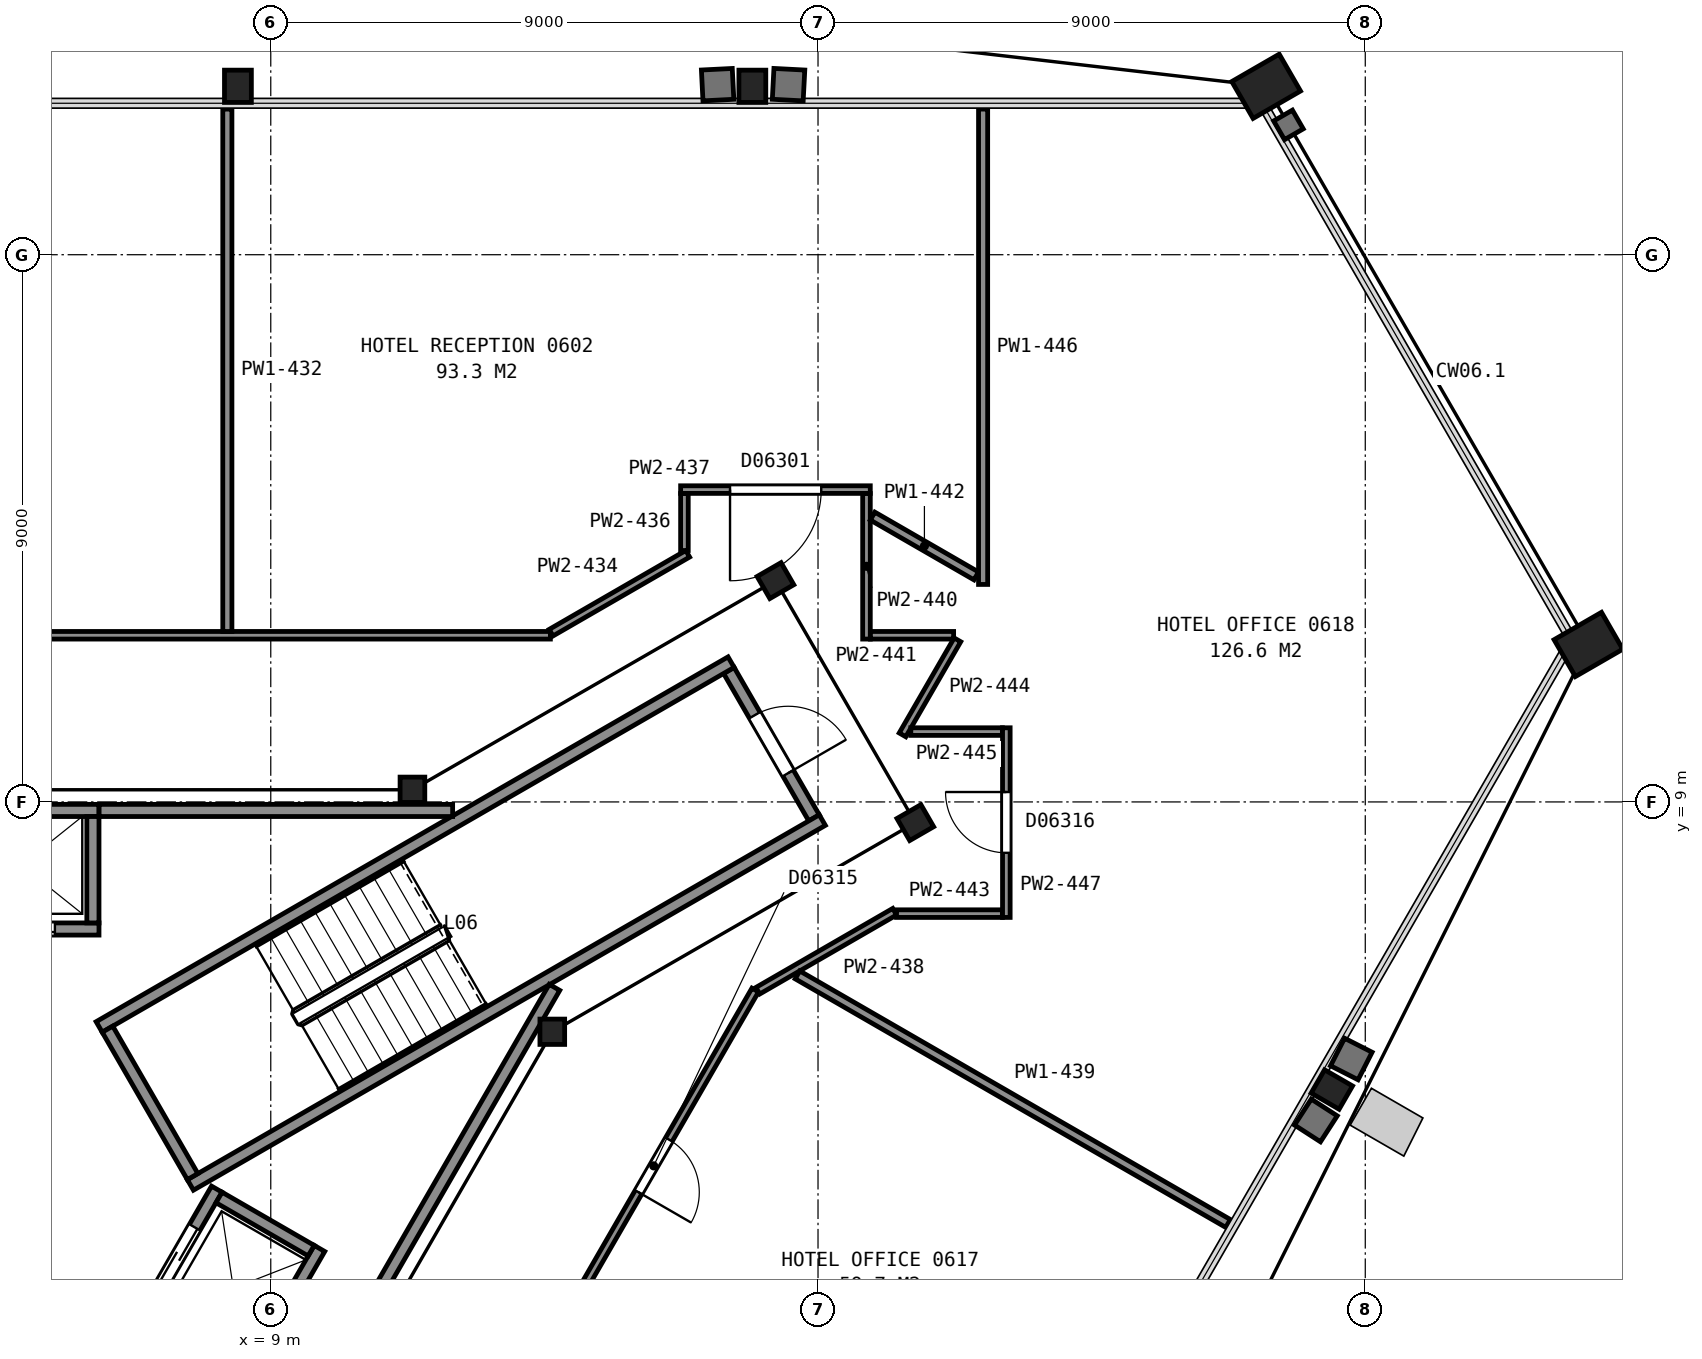
"""IFC4 building model, lengths in metres.
Left out: names, types, materials, properties, quantities, classifications, styles, units other than length and angle.
Written with IfcOpenShell. Run it as: python <this file> out.ifc"""

import sys

from ifc_helpers import new_model, si_unit, direction, frame, frame_2d, origin, origin_2d, place, context, subcontext, project, spatial, rectangle, hollow_rectangle, i_section, extrude, element, fill, save


model = new_model("IFC4")
c1 = context("Model", 3, precision=1e-05, world=origin(), true_north=direction((0.0, 1.0)))
c2 = subcontext(c1, "Body", "Model", "MODEL_VIEW")
j1 = project(units=[si_unit("LENGTHUNIT", "METRE"), si_unit("PLANEANGLEUNIT", "RADIAN")], contexts=[c1])
p1 = place(None, origin())
s1 = spatial("IfcSite", under=j1, at=p1, CompositionType="ELEMENT")
p2 = place(p1, origin())
s2 = spatial("IfcBuilding", under=s1, at=p2, CompositionType="ELEMENT")
p3 = place(p2, frame((0.0, 0.0, 36.8)))
s3 = spatial("IfcBuildingStorey", under=s2, at=p3, CompositionType="ELEMENT", Elevation=36.8)
p4 = place(p3, frame((25.37, 20.77, 0.045), z_axis=(0.0, 0.0, 1.0), x_axis=(0.5, -0.866025403784, 0.0)))
e1 = element("IfcColumn", 1, at=p4, inside=s3, PredefinedType="COLUMN", context=c2, shape_type="SweptSolid", body=[
    extrude(hollow_rectangle(XDim=0.7, YDim=0.9, WallThickness=0.065, at=origin_2d()), origin(), (0.0, 0.0, 1.0), 3.555),
])
p5 = place(p3, frame((16.92, 20.77, 0.03), z_axis=(0.0, 0.0, 1.0), x_axis=(1.0, 0.0, 0.0)))
e2 = element("IfcColumn", 2, at=p5, inside=s3, PredefinedType="COLUMN", context=c2, shape_type="SweptSolid", body=[
    extrude(i_section(OverallWidth=0.442, OverallDepth=0.531, WebThickness=0.066, FlangeThickness=0.106, FilletRadius=0.015, at=origin_2d()), origin(), (0.0, 0.0, 1.0), 3.57),
])
p6 = place(p3, frame((8.46, 20.77, 0.025), z_axis=(0.0, 0.0, 1.0), x_axis=(1.0, 0.0, 0.0)))
e3 = element("IfcColumn", 3, at=p6, inside=s3, PredefinedType="COLUMN", context=c2, shape_type="SweptSolid", body=[
    extrude(i_section(OverallWidth=0.442, OverallDepth=0.531, WebThickness=0.066, FlangeThickness=0.106, FilletRadius=0.015, at=origin_2d()), origin(), (0.0, 0.0, 1.0), 3.575),
])
p7 = place(p3, frame((26.45, 4.27, 0.03), z_axis=(0.0, 0.0, 1.0), x_axis=(-0.5, -0.866025403784, 0.0)))
e4 = element("IfcColumn", 4, at=p7, inside=s3, PredefinedType="COLUMN", context=c2, shape_type="SweptSolid", body=[
    extrude(i_section(OverallWidth=0.442, OverallDepth=0.531, WebThickness=0.066, FlangeThickness=0.106, FilletRadius=0.015, at=origin_2d()), origin(), (0.0, 0.0, 1.0), 3.57),
])
p8 = place(p3, frame((30.67, 11.59, 0.045), z_axis=(0.0, 0.0, 1.0), x_axis=(0.5, -0.866025403784, 0.0)))
e5 = element("IfcColumn", 5, at=p8, inside=s3, PredefinedType="COLUMN", context=c2, shape_type="SweptSolid", body=[
    extrude(hollow_rectangle(XDim=0.7, YDim=0.9, WallThickness=0.065, at=origin_2d()), origin(), (0.0, 0.0, 1.0), 3.555),
])
p9 = place(p3, frame((13.63, 5.22, 0.0), z_axis=(0.0, 0.0, 1.0), x_axis=(1.0, 0.0, 0.0)))
e6 = element("IfcColumn", 6, at=p9, inside=s3, PredefinedType="COLUMN", context=c2, shape_type="SweptSolid", body=[
    extrude(i_section(OverallWidth=0.406, OverallDepth=0.417, WebThickness=0.03, FlangeThickness=0.048, FilletRadius=0.015, at=origin_2d()), origin(), (0.0, 0.0, 1.0), 3.6),
])
for number, where, z_axis, x_axis in (
    (7, (19.6, 8.66, 0.0), (0.0, 0.0, 1.0), (0.5, -0.866, 0.0)),
    (8, (17.3, 12.64, 0.0), (0.0, 0.0, 1.0), (0.5, -0.866, 0.0)),
):
    element("IfcColumn", number, at=place(p3, frame(where, z_axis=z_axis, x_axis=x_axis)), inside=s3, PredefinedType="COLUMN", context=c2, shape_type="SweptSolid", body=[
        extrude(i_section(OverallWidth=0.419, OverallDepth=0.455, WebThickness=0.042, FlangeThickness=0.068, FilletRadius=0.015, at=origin_2d()), origin(), (0.0, 0.0, 1.0), 3.6),
    ])
p10 = place(p3, frame((11.33, 9.2, 0.0), z_axis=(0.0, 0.0, 1.0), x_axis=(1.0, 0.0, 0.0)))
e9 = element("IfcColumn", 9, at=p10, inside=s3, PredefinedType="COLUMN", context=c2, shape_type="SweptSolid", body=[
    extrude(i_section(OverallWidth=0.406, OverallDepth=0.417, WebThickness=0.03, FlangeThickness=0.048, FilletRadius=0.015, at=origin_2d()), origin(), (0.0, 0.0, 1.0), 3.6),
])
p11 = place(p3, frame((17.934, 8.738, 0.0), z_axis=(0.0, 0.0, 1.0), x_axis=(-0.49998411664, 0.866034573852, 0.0)))
e10 = element("IfcWall", 10, at=p11, inside=s3, PredefinedType="PARTITIONING", context=c2, shape_type="SweptSolid", body=[
    extrude(rectangle(XDim=2.8, YDim=0.2, at=frame_2d((1.4, 0.0))), origin(), (0.0, 0.0, 1.0), 3.35),
])
p12 = place(p11, frame((0.85, 0.0, 0.0)))
e11 = element("IfcOpeningElement", 11, at=p12, cuts=e10, PredefinedType="OPENING", context=c2, shape_type="SweptSolid", body=[
    extrude(rectangle(XDim=1.1, YDim=2.1, at=frame_2d((0.55, 1.05))), frame((0.0, 0.11, 0.0), z_axis=(0.0, -1.0, 0.0), x_axis=(1.0, 0.0, 0.0)), (0.0, 0.0, 1.0), 0.22),
])
for number, where, z_axis, x_axis in (
    (12, (6.178, 5.299, 0.0), (0.0, 0.0, 1.0), (0.866, 0.5, 0.0)),
    (13, (7.678, 2.701, 0.0), (0.0, 0.0, 1.0), (0.866, 0.5, 0.0)),
):
    element("IfcWall", number, at=place(p3, frame(where, z_axis=z_axis, x_axis=x_axis)), inside=s3, PredefinedType="PARTITIONING", context=c2, shape_type="SweptSolid", body=[
        extrude(rectangle(XDim=12.0, YDim=0.2, at=frame_2d((6.0, 0.0))), origin(), (0.0, 0.0, 1.0), 3.35),
    ])
p13 = place(p3, frame((7.715, 2.838, 0.0), z_axis=(0.0, 0.0, 1.0), x_axis=(-0.500049511043, 0.865996816683, 0.0)))
e14 = element("IfcWall", 14, at=p13, inside=s3, PredefinedType="PARTITIONING", context=c2, shape_type="SweptSolid", body=[
    extrude(rectangle(XDim=2.8, YDim=0.2, at=frame_2d((1.4, 0.0))), origin(), (0.0, 0.0, 1.0), 3.35),
])
p14 = place(p3, frame((3.625, 6.91, 0.0), z_axis=(0.0, 0.0, 1.0), x_axis=(1.0, 0.0, 0.0)))
e15 = element("IfcWall", 15, at=p14, inside=s3, PredefinedType="PARTITIONING", context=c2, shape_type="SweptSolid", body=[
    extrude(rectangle(XDim=2.55, YDim=0.2, at=frame_2d((1.275, 0.0))), origin(), (0.0, 0.0, 1.0), 3.6),
])
p15 = place(p14, frame((0.725, 0.0, 0.0)))
e16 = element("IfcOpeningElement", 16, at=p15, cuts=e15, PredefinedType="OPENING", context=c2, shape_type="SweptSolid", body=[
    extrude(rectangle(XDim=1.1, YDim=2.1, at=frame_2d((0.55, 1.05))), frame((0.0, 0.11, 0.0), z_axis=(0.0, -1.0, 0.0), x_axis=(1.0, 0.0, 0.0)), (0.0, 0.0, 1.0), 0.22),
])
p16 = place(p3, frame((3.625, 8.86, 0.0), z_axis=(0.0, 0.0, 1.0), x_axis=(1.0, 0.0, 0.0)))
e17 = element("IfcWall", 17, at=p16, inside=s3, PredefinedType="PARTITIONING", context=c2, shape_type="SweptSolid", body=[
    extrude(rectangle(XDim=2.55, YDim=0.2, at=frame_2d((1.275, 0.0))), origin(), (0.0, 0.0, 1.0), 3.6),
])
p17 = place(p3, frame((7.451, -2.414, 0.0), z_axis=(0.0, 0.0, 1.0), x_axis=(0.500016218704, 0.866016039709, 0.0)))
e18 = element("IfcWall", 18, at=p17, inside=s3, PredefinedType="PARTITIONING", context=c2, shape_type="SweptSolid", body=[
    extrude(rectangle(XDim=4.7, YDim=0.2, at=frame_2d((2.35, 0.0))), origin(), (0.0, 0.0, 1.0), 3.6),
])
p18 = place(p3, frame((5.663, -1.612, 0.0), z_axis=(0.0, 0.0, 1.0), x_axis=(0.49998122708, 0.866036242063, 0.0)))
e19 = element("IfcWall", 19, at=p18, inside=s3, PredefinedType="PARTITIONING", context=c2, shape_type="SweptSolid", body=[
    extrude(rectangle(XDim=4.9, YDim=0.2, at=frame_2d((2.45, 0.0))), origin(), (0.0, 0.0, 1.0), 3.6),
])
p19 = place(p18, frame((3.075, 0.0, 0.0)))
e20 = element("IfcOpeningElement", 20, at=p19, cuts=e19, PredefinedType="OPENING", context=c2, shape_type="SweptSolid", body=[
    extrude(rectangle(XDim=1.1, YDim=2.1, at=frame_2d((0.55, 1.05))), frame((0.0, 0.11, 0.0), z_axis=(0.0, -1.0, 0.0), x_axis=(1.0, 0.0, 0.0)), (0.0, 0.0, 1.0), 0.22),
])
p20 = place(p18, frame((0.725, 0.0, 0.0)))
e21 = element("IfcOpeningElement", 21, at=p20, cuts=e19, PredefinedType="OPENING", context=c2, shape_type="SweptSolid", body=[
    extrude(rectangle(XDim=1.1, YDim=2.1, at=frame_2d((0.55, 1.05))), frame((0.0, 0.11, 0.0), z_axis=(0.0, -1.0, 0.0), x_axis=(1.0, 0.0, 0.0)), (0.0, 0.0, 1.0), 0.22),
])
p21 = place(p3, frame((6.075, 7.01, 0.0), z_axis=(0.0, 0.0, 1.0), x_axis=(0.0, 1.0, 0.0)))
e22 = element("IfcWall", 22, at=p21, inside=s3, PredefinedType="PARTITIONING", context=c2, shape_type="SweptSolid", body=[
    extrude(rectangle(XDim=1.75, YDim=0.2, at=frame_2d((0.875, 0.0))), origin(), (0.0, 0.0, 1.0), 3.6),
])
p22 = place(p3, frame((9.665, 1.62, 0.0), z_axis=(0.0, 0.0, 1.0), x_axis=(-0.866002029911, 0.500040482552, 0.0)))
e23 = element("IfcWall", 23, at=p22, inside=s3, PredefinedType="PARTITIONING", context=c2, shape_type="SweptSolid", body=[
    extrude(rectangle(XDim=1.75, YDim=0.2, at=frame_2d((0.875, 0.0))), origin(), (0.0, 0.0, 1.0), 3.6),
])
p23 = place(p3, frame((6.177, 8.86, 0.0), z_axis=(0.0, 0.0, 1.0), x_axis=(1.0, 0.0, 0.0)))
e24 = element("IfcWall", 24, at=p23, inside=s3, PredefinedType="PARTITIONING", context=c2, shape_type="SweptSolid", body=[
    extrude(rectangle(XDim=5.814, YDim=0.2, at=frame_2d((2.907, 0.0))), origin(), (0.0, 0.0, 1.0), 3.35),
])
p24 = place(p3, frame((8.492, -3.012, 0.0), z_axis=(0.0, 0.0, 1.0), x_axis=(0.499972957231, 0.866041016371, 0.0)))
e25 = element("IfcWall", 25, at=p24, inside=s3, PredefinedType="PARTITIONING", context=c2, shape_type="SweptSolid", body=[
    extrude(rectangle(XDim=10.349, YDim=0.2, at=frame_2d((5.174, 0.0))), origin(), (0.0, 0.0, 1.0), 3.35),
])
p25 = place(p3, frame((-13.598, 11.741, 0.0), z_axis=(0.0, 0.0, 1.0), x_axis=(1.0, 0.0, 0.0)))
e26 = element("IfcWall", 26, at=p25, inside=s3, PredefinedType="PARTITIONING", context=c2, shape_type="SweptSolid", body=[
    extrude(rectangle(XDim=27.197, YDim=0.125, at=frame_2d((13.598, 0.0))), origin(), (0.0, 0.0, 1.0), 2.613),
])
p26 = place(p25, frame((13.884, 0.0, 0.0)))
e27 = element("IfcOpeningElement", 27, at=p26, cuts=e26, PredefinedType="OPENING", context=c2, shape_type="SweptSolid", body=[
    extrude(rectangle(XDim=1.5, YDim=2.1, at=frame_2d((0.75, 1.05))), frame((0.0, 0.073, 0.0), z_axis=(0.0, -1.0, 0.0), x_axis=(1.0, 0.0, 0.0)), (0.0, 0.0, 1.0), 0.145),
])
p27 = place(p3, frame((16.967, 5.906, 0.0), z_axis=(0.0, 0.0, 1.0), x_axis=(-0.500024758804, -0.866011108811, 0.0)))
e28 = element("IfcWall", 28, at=p27, inside=s3, PredefinedType="PARTITIONING", context=c2, shape_type="SweptSolid", body=[
    extrude(rectangle(XDim=26.402, YDim=0.125, at=frame_2d((13.201, 0.0))), origin(), (0.0, 0.0, 1.0), 2.613),
])
p28 = place(p27, frame((21.332, 0.0, 0.0)))
e29 = element("IfcOpeningElement", 29, at=p28, cuts=e28, PredefinedType="OPENING", context=c2, shape_type="SweptSolid", body=[
    extrude(rectangle(XDim=1.2, YDim=2.1, at=frame_2d((0.6, 1.05))), frame((0.0, 0.073, 0.0), z_axis=(0.0, -1.0, 0.0), x_axis=(1.0, 0.0, 0.0)), (0.0, 0.0, 1.0), 0.145),
])
p29 = place(p27, frame((15.801, 0.0, 0.0)))
e30 = element("IfcOpeningElement", 30, at=p29, cuts=e28, PredefinedType="OPENING", context=c2, shape_type="SweptSolid", body=[
    extrude(rectangle(XDim=1.0, YDim=2.1, at=frame_2d((0.5, 1.05))), frame((0.0, 0.073, 0.0), z_axis=(0.0, -1.0, 0.0), x_axis=(1.0, 0.0, 0.0)), (0.0, 0.0, 1.0), 0.145),
])
p30 = place(p27, frame((9.642, 0.0, 0.0)))
e31 = element("IfcOpeningElement", 31, at=p30, cuts=e28, PredefinedType="OPENING", context=c2, shape_type="SweptSolid", body=[
    extrude(rectangle(XDim=1.0, YDim=2.1, at=frame_2d((0.5, 1.05))), frame((0.0, 0.073, 0.0), z_axis=(0.0, -1.0, 0.0), x_axis=(1.0, 0.0, 0.0)), (0.0, 0.0, 1.0), 0.145),
])
p31 = place(p27, frame((2.839, 0.0, 0.0)))
e32 = element("IfcOpeningElement", 32, at=p31, cuts=e28, PredefinedType="OPENING", context=c2, shape_type="SweptSolid", body=[
    extrude(rectangle(XDim=1.0, YDim=2.1, at=frame_2d((0.5, 1.05))), frame((0.0, 0.073, 0.0), z_axis=(0.0, -1.0, 0.0), x_axis=(1.0, 0.0, 0.0)), (0.0, 0.0, 1.0), 0.145),
])
p32 = place(p3, frame((8.286, 11.803, 0.0), z_axis=(0.0, 0.0, 1.0), x_axis=(0.0, 1.0, 0.0)))
e33 = element("IfcWall", 33, at=p32, inside=s3, PredefinedType="PARTITIONING", context=c2, shape_type="SweptSolid", body=[
    extrude(rectangle(XDim=8.592, YDim=0.15, at=frame_2d((4.296, 0.0))), origin(), (0.0, 0.0, 1.0), 2.613),
])
p33 = place(p3, frame((13.61, 11.783, 0.0), z_axis=(0.0, 0.0, 1.0), x_axis=(0.865988195383, 0.500064441305, 0.0)))
e34 = element("IfcWall", 34, at=p33, inside=s3, PredefinedType="PARTITIONING", context=c2, shape_type="SweptSolid", body=[
    extrude(rectangle(XDim=2.595, YDim=0.125, at=frame_2d((1.298, 0.0))), origin(), (0.0, 0.0, 1.0), 2.613),
])
p34 = place(p3, frame((15.803, 13.135, 0.0), z_axis=(0.0, 0.0, 1.0), x_axis=(0.0, 1.0, 0.0)))
e35 = element("IfcWall", 35, at=p34, inside=s3, PredefinedType="PARTITIONING", context=c2, shape_type="SweptSolid", body=[
    extrude(rectangle(XDim=0.937, YDim=0.125, at=frame_2d((0.469, 0.0))), origin(), (0.0, 0.0, 1.0), 2.613),
])
p35 = place(p3, frame((15.74, 14.137, 0.0), z_axis=(0.0, 0.0, 1.0), x_axis=(1.0, 0.0, 0.0)))
e36 = element("IfcWall", 36, at=p35, inside=s3, PredefinedType="PARTITIONING", context=c2, shape_type="SweptSolid", body=[
    extrude(rectangle(XDim=3.119, YDim=0.125, at=frame_2d((1.56, 0.0))), origin(), (0.0, 0.0, 1.0), 2.613),
])
p36 = place(p35, frame((0.812, 0.0, 0.0)))
e37 = element("IfcOpeningElement", 37, at=p36, cuts=e36, PredefinedType="OPENING", context=c2, shape_type="SweptSolid", body=[
    extrude(rectangle(XDim=1.5, YDim=2.1, at=frame_2d((0.75, 1.05))), frame((0.0, 0.073, 0.0), z_axis=(0.0, -1.0, 0.0), x_axis=(1.0, 0.0, 0.0)), (0.0, 0.0, 1.0), 0.145),
])
p37 = place(p3, frame((17.01, 5.895, 0.0), z_axis=(0.0, 0.0, 1.0), x_axis=(0.865944638795, 0.50013986298, 0.0)))
e38 = element("IfcWall", 38, at=p37, inside=s3, PredefinedType="PARTITIONING", context=c2, shape_type="SweptSolid", body=[
    extrude(rectangle(XDim=2.599, YDim=0.125, at=frame_2d((1.299, 0.0))), origin(), (0.0, 0.0, 1.0), 2.613),
])
p38 = place(p3, frame((17.662, 6.155, 0.0), z_axis=(0.0, 0.0, 1.0), x_axis=(0.866038908564, -0.499976608306, 0.0)))
e39 = element("IfcWall", 39, at=p38, inside=s3, PredefinedType="PARTITIONING", context=c2, shape_type="SweptSolid", body=[
    extrude(rectangle(XDim=8.177, YDim=0.15, at=frame_2d((4.088, 0.0))), origin(), (0.0, 0.0, 1.0), 2.613),
])
p39 = place(p3, frame((18.797, 11.678, 0.0), z_axis=(0.0, 0.0, 1.0), x_axis=(0.0, 1.0, 0.0)))
e40 = element("IfcWall", 40, at=p39, inside=s3, PredefinedType="PARTITIONING", context=c2, shape_type="SweptSolid", body=[
    extrude(rectangle(XDim=2.394, YDim=0.125, at=frame_2d((1.197, 0.0))), origin(), (0.0, 0.0, 1.0), 2.613),
])
p40 = place(p3, frame((18.862, 11.741, 0.0), z_axis=(0.0, 0.0, 1.0), x_axis=(1.0, 0.0, 0.0)))
e41 = element("IfcWall", 41, at=p40, inside=s3, PredefinedType="PARTITIONING", context=c2, shape_type="SweptSolid", body=[
    extrude(rectangle(XDim=1.368, YDim=0.125, at=frame_2d((0.684, 0.0))), origin(), (0.0, 0.0, 1.0), 2.613),
])
p41 = place(p3, frame((18.897, 13.701, 0.0), z_axis=(0.0, 0.0, 1.0), x_axis=(0.866121584746, -0.499833372672, 0.0)))
e42 = element("IfcWall", 42, at=p41, inside=s3, PredefinedType="PARTITIONING", context=c2, shape_type="SweptSolid", body=[
    extrude(rectangle(XDim=1.969, YDim=0.15, at=frame_2d((0.984, 0.0))), origin(), (0.0, 0.0, 1.0), 2.613),
])
p42 = place(p3, frame((19.291, 7.163, 0.0), z_axis=(0.0, 0.0, 1.0), x_axis=(1.0, 0.0, 0.0)))
e43 = element("IfcWall", 43, at=p42, inside=s3, PredefinedType="PARTITIONING", context=c2, shape_type="SweptSolid", body=[
    extrude(rectangle(XDim=1.741, YDim=0.125, at=frame_2d((0.871, 0.0))), origin(), (0.0, 0.0, 1.0), 2.613),
])
p43 = place(p3, frame((19.39, 10.103, 0.0), z_axis=(0.0, 0.0, 1.0), x_axis=(0.500327160669, 0.865836435071, 0.0)))
e44 = element("IfcWall", 44, at=p43, inside=s3, PredefinedType="PARTITIONING", context=c2, shape_type="SweptSolid", body=[
    extrude(rectangle(XDim=1.805, YDim=0.125, at=frame_2d((0.903, 0.0))), origin(), (0.0, 0.0, 1.0), 2.613),
])
p44 = place(p3, frame((19.526, 10.157, 0.0), z_axis=(0.0, 0.0, 1.0), x_axis=(1.0, 0.0, 0.0)))
e45 = element("IfcWall", 45, at=p44, inside=s3, PredefinedType="PARTITIONING", context=c2, shape_type="SweptSolid", body=[
    extrude(rectangle(XDim=1.506, YDim=0.125, at=frame_2d((0.753, 0.0))), origin(), (0.0, 0.0, 1.0), 2.613),
])
p45 = place(p3, frame((20.715, 12.577, 0.0), z_axis=(0.0, 0.0, 1.0), x_axis=(0.0, 1.0, 0.0)))
e46 = element("IfcWall", 46, at=p45, inside=s3, PredefinedType="PARTITIONING", context=c2, shape_type="SweptSolid", body=[
    extrude(rectangle(XDim=7.818, YDim=0.15, at=frame_2d((3.909, 0.0))), origin(), (0.0, 0.0, 1.0), 2.613),
])
p46 = place(p3, frame((21.097, 10.219, 0.0), z_axis=(0.0, 0.0, 1.0), x_axis=(0.0, -1.0, 0.0)))
e47 = element("IfcWall", 47, at=p46, inside=s3, PredefinedType="PARTITIONING", context=c2, shape_type="SweptSolid", body=[
    extrude(rectangle(XDim=3.119, YDim=0.125, at=frame_2d((1.56, 0.0))), origin(), (0.0, 0.0, 1.0), 2.613),
])
p47 = place(p46, frame((1.056, 0.0, 0.0)))
e48 = element("IfcOpeningElement", 48, at=p47, cuts=e47, PredefinedType="OPENING", context=c2, shape_type="SweptSolid", body=[
    extrude(rectangle(XDim=1.0, YDim=2.1, at=frame_2d((0.5, 1.05))), frame((0.0, 0.073, 0.0), z_axis=(0.0, -1.0, 0.0), x_axis=(1.0, 0.0, 0.0)), (0.0, 0.0, 1.0), 0.145),
])
p48 = place(p12, origin())
e49 = element("IfcDoor", 49, at=p48, inside=s3, OperationType="SINGLE_SWING_LEFT", PredefinedType="DOOR", context=c2, shape_type="SweptSolid", body=[
    extrude(rectangle(XDim=1.1, YDim=2.1, at=frame_2d((0.55, 1.05))), frame((0.0, 0.025, 0.0), z_axis=(0.0, -1.0, 0.0), x_axis=(1.0, 0.0, 0.0)), (0.0, 0.0, 1.0), 0.05),
])
fill(e11, e49)
p49 = place(p19, origin())
e50 = element("IfcDoor", 50, at=p49, inside=s3, OperationType="SLIDING_TO_LEFT", PredefinedType="DOOR", context=c2, shape_type="SweptSolid", body=[
    extrude(rectangle(XDim=1.1, YDim=2.1, at=frame_2d((0.55, 1.05))), frame((0.0, 0.025, 0.0), z_axis=(0.0, -1.0, 0.0), x_axis=(1.0, 0.0, 0.0)), (0.0, 0.0, 1.0), 0.05),
])
fill(e20, e50)
p50 = place(p15, origin())
e51 = element("IfcDoor", 51, at=p50, inside=s3, OperationType="SLIDING_TO_LEFT", PredefinedType="DOOR", context=c2, shape_type="SweptSolid", body=[
    extrude(rectangle(XDim=1.1, YDim=2.1, at=frame_2d((0.55, 1.05))), frame((0.0, 0.025, 0.0), z_axis=(0.0, -1.0, 0.0), x_axis=(1.0, 0.0, 0.0)), (0.0, 0.0, 1.0), 0.05),
])
fill(e16, e51)
p51 = place(p31, origin())
e52 = element("IfcDoor", 52, at=p51, inside=s3, OperationType="SINGLE_SWING_RIGHT", PredefinedType="DOOR", context=c2, shape_type="SweptSolid", body=[
    extrude(rectangle(XDim=1.0, YDim=2.1, at=frame_2d((0.5, 1.05))), frame((0.0, 0.025, 0.0), z_axis=(0.0, -1.0, 0.0), x_axis=(1.0, 0.0, 0.0)), (0.0, 0.0, 1.0), 0.05),
])
fill(e32, e52)
p52 = place(p36, origin())
e53 = element("IfcDoor", 53, at=p52, inside=s3, OperationType="DOUBLE_DOOR_SINGLE_SWING", PredefinedType="DOOR", context=c2, shape_type="SweptSolid", body=[
    extrude(rectangle(XDim=1.5, YDim=2.1, at=frame_2d((0.75, 1.05))), frame((0.0, 0.025, 0.0), z_axis=(0.0, -1.0, 0.0), x_axis=(1.0, 0.0, 0.0)), (0.0, 0.0, 1.0), 0.05),
])
fill(e37, e53)
p53 = place(p47, origin())
e54 = element("IfcDoor", 54, at=p53, inside=s3, OperationType="SINGLE_SWING_LEFT", PredefinedType="DOOR", context=c2, shape_type="SweptSolid", body=[
    extrude(rectangle(XDim=1.0, YDim=2.1, at=frame_2d((0.5, 1.05))), frame((0.0, 0.025, 0.0), z_axis=(0.0, -1.0, 0.0), x_axis=(1.0, 0.0, 0.0)), (0.0, 0.0, 1.0), 0.05),
])
fill(e48, e54)
save(model, sys.argv[1])
